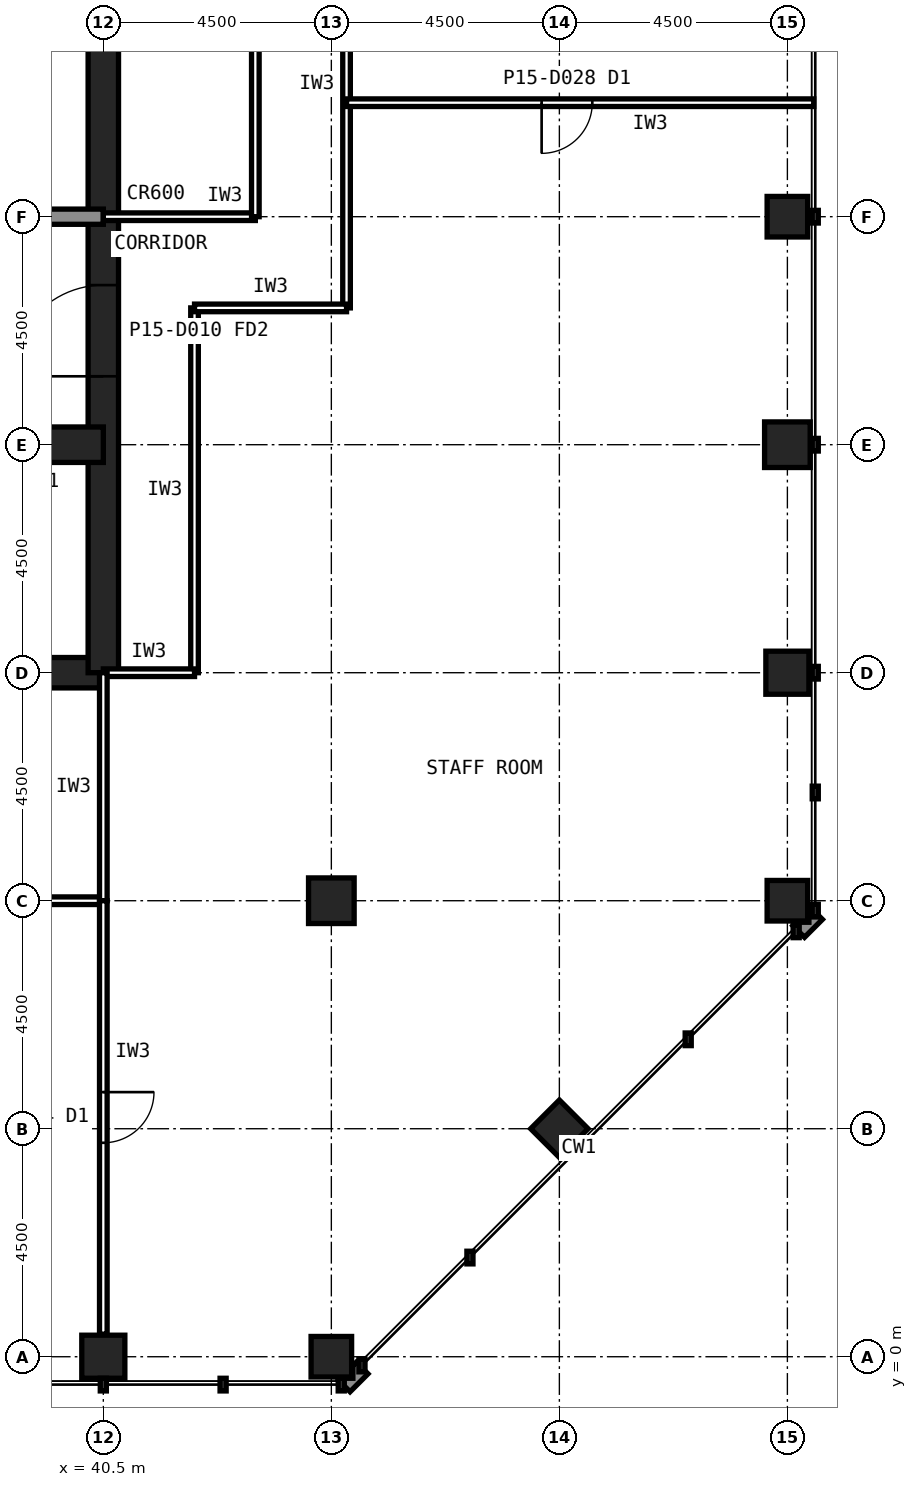
"""IFC4 building model, lengths in metres.
Left out: names, types, materials, properties, quantities, classifications, styles, units other than length and angle.
Written with IfcOpenShell. Run it as: python <this file> out.ifc"""

import sys

from ifc_helpers import new_model, si_unit, direction, frame, frame_2d, origin, origin_2d, place, context, subcontext, project, spatial, rectangle, hollow_rectangle, extrude, element, fill, save


model = new_model("IFC4")
c1 = context("Model", 3, precision=1e-05, world=origin(), true_north=direction((0.0, 1.0)))
c2 = subcontext(c1, "Body", "Model", "MODEL_VIEW")
j1 = project(units=[si_unit("LENGTHUNIT", "METRE"), si_unit("PLANEANGLEUNIT", "RADIAN")], contexts=[c1])
p1 = place(None, origin())
s1 = spatial("IfcSite", under=j1, at=p1, CompositionType="ELEMENT")
p2 = place(p1, origin())
s2 = spatial("IfcBuilding", under=s1, at=p2, CompositionType="ELEMENT")
p3 = place(p2, frame((0.0, 0.0, 62.6)))
s3 = spatial("IfcBuildingStorey", under=s2, at=p3, CompositionType="ELEMENT", Elevation=62.6)
p4 = place(p3, frame((40.5, 0.0, 0.0), z_axis=(0.0, 0.0, 1.0), x_axis=(1.0, 0.0, 0.0)))
e1 = element("IfcColumn", 1, at=p4, inside=s3, PredefinedType="COLUMN", context=c2, shape_type="SweptSolid", body=[
    extrude(hollow_rectangle(XDim=0.85, YDim=0.85, WallThickness=0.05, at=origin_2d()), origin(), (0.0, 0.0, 1.0), 4.2),
])
for number, where, z_axis, x_axis in (
    (2, (45.0, 0.0, 0.0), (0.0, 0.0, 1.0), (1.0, 0.0, 0.0)),
    (3, (54.0, 9.0, 0.0), (0.0, 0.0, 1.0), (1.0, 0.0, 0.0)),
):
    element("IfcColumn", number, at=place(p3, frame(where, z_axis=z_axis, x_axis=x_axis)), inside=s3, PredefinedType="COLUMN", context=c2, shape_type="SweptSolid", body=[
        extrude(hollow_rectangle(XDim=0.8, YDim=0.8, WallThickness=0.045, at=origin_2d()), origin(), (0.0, 0.0, 1.0), 4.2),
    ])
p5 = place(p3, frame((54.0, 13.5, 0.0), z_axis=(0.0, 0.0, 1.0), x_axis=(1.0, 0.0, 0.0)))
e4 = element("IfcColumn", 4, at=p5, inside=s3, PredefinedType="COLUMN", context=c2, shape_type="SweptSolid", body=[
    extrude(hollow_rectangle(XDim=0.85, YDim=0.85, WallThickness=0.05, at=origin_2d()), origin(), (0.0, 0.0, 1.0), 4.2),
])
p6 = place(p3, frame((54.0, 18.0, 0.0), z_axis=(0.0, 0.0, 1.0), x_axis=(1.0, 0.0, 0.0)))
e5 = element("IfcColumn", 5, at=p6, inside=s3, PredefinedType="COLUMN", context=c2, shape_type="SweptSolid", body=[
    extrude(hollow_rectangle(XDim=0.9, YDim=0.9, WallThickness=0.063, at=origin_2d()), origin(), (0.0, 0.0, 1.0), 4.2),
])
for number, where, z_axis, x_axis in (
    (6, (54.0, 22.5, 0.0), (0.0, 0.0, 1.0), (1.0, 0.0, 0.0)),
    (7, (49.5, 4.5, 0.0), (0.0, 0.0, 1.0), (0.707, 0.707, 0.0)),
):
    element("IfcColumn", number, at=place(p3, frame(where, z_axis=z_axis, x_axis=x_axis)), inside=s3, PredefinedType="COLUMN", context=c2, shape_type="SweptSolid", body=[
        extrude(hollow_rectangle(XDim=0.8, YDim=0.8, WallThickness=0.045, at=origin_2d()), origin(), (0.0, 0.0, 1.0), 4.2),
    ])
p7 = place(p3, frame((45.0, 9.0, 0.0), z_axis=(0.0, 0.0, 1.0), x_axis=(1.0, 0.0, 0.0)))
e8 = element("IfcColumn", 8, at=p7, inside=s3, PredefinedType="COLUMN", context=c2, shape_type="SweptSolid", body=[
    extrude(hollow_rectangle(XDim=0.9, YDim=0.9, WallThickness=0.063, at=origin_2d()), origin(), (0.0, 0.0, 1.0), 4.2),
])
p8 = place(p3, frame((13.5, 13.5, 0.0), z_axis=(0.0, 0.0, 1.0), x_axis=(1.0, 0.0, 0.0)))
e9 = element("IfcWall", 9, at=p8, inside=s3, PredefinedType="SHEAR", context=c2, shape_type="SweptSolid", body=[
    extrude(rectangle(XDim=27.0, YDim=0.6, at=frame_2d((13.5, 0.0))), origin(), (0.0, 0.0, 1.0), 4.2),
])
p9 = place(p3, frame((40.5, 13.5, 0.0), z_axis=(0.0, 0.0, 1.0), x_axis=(0.0, 1.0, 0.0)))
e10 = element("IfcWall", 10, at=p9, inside=s3, PredefinedType="SHEAR", context=c2, shape_type="SweptSolid", body=[
    extrude(rectangle(XDim=27.0, YDim=0.6, at=frame_2d((13.5, 0.0))), origin(), (0.0, 0.0, 1.0), 4.2),
])
p10 = place(p9, frame((5.85, 0.0, 0.0)))
e11 = element("IfcOpeningElement", 11, at=p10, cuts=e10, PredefinedType="OPENING", context=c2, shape_type="SweptSolid", body=[
    extrude(rectangle(XDim=1.8, YDim=2.1, at=frame_2d((0.9, 1.05))), frame((0.0, 0.31, 0.0), z_axis=(0.0, -1.0, 0.0), x_axis=(1.0, 0.0, 0.0)), (0.0, 0.0, 1.0), 0.62),
])
p11 = place(p9, frame((19.65, 0.0, 0.0)))
e12 = element("IfcOpeningElement", 12, at=p11, cuts=e10, PredefinedType="OPENING", context=c2, shape_type="SweptSolid", body=[
    extrude(rectangle(XDim=1.2, YDim=2.1, at=frame_2d((0.6, 1.05))), frame((0.0, 0.31, 0.0), z_axis=(0.0, -1.0, 0.0), x_axis=(1.0, 0.0, 0.0)), (0.0, 0.0, 1.0), 0.62),
])
p12 = place(p3, frame((13.5, 18.0, 0.0), z_axis=(0.0, 0.0, 1.0), x_axis=(1.0, 0.0, 0.0)))
e13 = element("IfcWall", 13, at=p12, inside=s3, PredefinedType="SHEAR", context=c2, shape_type="SweptSolid", body=[
    extrude(rectangle(XDim=27.0, YDim=0.7, at=frame_2d((13.5, 0.0))), origin(), (0.0, 0.0, 1.0), 4.2),
])
p13 = place(p12, frame((24.3, 0.0, 0.0)))
e14 = element("IfcOpeningElement", 14, at=p13, cuts=e13, PredefinedType="OPENING", context=c2, shape_type="SweptSolid", body=[
    extrude(rectangle(XDim=0.9, YDim=2.1, at=frame_2d((0.45, 1.05))), frame((0.0, 0.36, 0.0), z_axis=(0.0, -1.0, 0.0), x_axis=(1.0, 0.0, 0.0)), (0.0, 0.0, 1.0), 0.72),
])
p14 = place(p12, frame((5.45, 0.0, 0.0)))
e15 = element("IfcOpeningElement", 15, at=p14, cuts=e13, PredefinedType="OPENING", context=c2, shape_type="SweptSolid", body=[
    extrude(rectangle(XDim=1.1, YDim=2.1, at=frame_2d((0.55, 1.05))), frame((0.0, 0.36, 0.0), z_axis=(0.0, -1.0, 0.0), x_axis=(1.0, 0.0, 0.0)), (0.0, 0.0, 1.0), 0.72),
])
p15 = place(p12, frame((8.45, 0.0, 0.0)))
e16 = element("IfcOpeningElement", 16, at=p15, cuts=e13, PredefinedType="OPENING", context=c2, shape_type="SweptSolid", body=[
    extrude(rectangle(XDim=1.1, YDim=2.1, at=frame_2d((0.55, 1.05))), frame((0.0, 0.36, 0.0), z_axis=(0.0, -1.0, 0.0), x_axis=(1.0, 0.0, 0.0)), (0.0, 0.0, 1.0), 0.72),
])
p16 = place(p12, frame((11.45, 0.0, 0.0)))
e17 = element("IfcOpeningElement", 17, at=p16, cuts=e13, PredefinedType="OPENING", context=c2, shape_type="SweptSolid", body=[
    extrude(rectangle(XDim=1.1, YDim=2.1, at=frame_2d((0.55, 1.05))), frame((0.0, 0.36, 0.0), z_axis=(0.0, -1.0, 0.0), x_axis=(1.0, 0.0, 0.0)), (0.0, 0.0, 1.0), 0.72),
])
p17 = place(p12, frame((14.45, 0.0, 0.0)))
e18 = element("IfcOpeningElement", 18, at=p17, cuts=e13, PredefinedType="OPENING", context=c2, shape_type="SweptSolid", body=[
    extrude(rectangle(XDim=1.1, YDim=2.1, at=frame_2d((0.55, 1.05))), frame((0.0, 0.36, 0.0), z_axis=(0.0, -1.0, 0.0), x_axis=(1.0, 0.0, 0.0)), (0.0, 0.0, 1.0), 0.72),
])
p18 = place(p12, frame((17.45, 0.0, 0.0)))
e19 = element("IfcOpeningElement", 19, at=p18, cuts=e13, PredefinedType="OPENING", context=c2, shape_type="SweptSolid", body=[
    extrude(rectangle(XDim=1.1, YDim=2.1, at=frame_2d((0.55, 1.05))), frame((0.0, 0.36, 0.0), z_axis=(0.0, -1.0, 0.0), x_axis=(1.0, 0.0, 0.0)), (0.0, 0.0, 1.0), 0.72),
])
p19 = place(p12, frame((20.45, 0.0, 0.0)))
e20 = element("IfcOpeningElement", 20, at=p19, cuts=e13, PredefinedType="OPENING", context=c2, shape_type="SweptSolid", body=[
    extrude(rectangle(XDim=1.1, YDim=2.1, at=frame_2d((0.55, 1.05))), frame((0.0, 0.36, 0.0), z_axis=(0.0, -1.0, 0.0), x_axis=(1.0, 0.0, 0.0)), (0.0, 0.0, 1.0), 0.72),
])
p20 = place(p12, frame((1.6, 0.0, 0.0)))
e21 = element("IfcOpeningElement", 21, at=p20, cuts=e13, PredefinedType="OPENING", context=c2, shape_type="SweptSolid", body=[
    extrude(rectangle(XDim=1.3, YDim=2.2, at=frame_2d((0.65, 1.1))), frame((0.0, 0.36, 0.0), z_axis=(0.0, -1.0, 0.0), x_axis=(1.0, 0.0, 0.0)), (0.0, 0.0, 1.0), 0.72),
])
p21 = place(p3, frame((13.5, 22.5, 0.0), z_axis=(0.0, 0.0, 1.0), x_axis=(1.0, 0.0, 0.0)))
e22 = element("IfcWall", 22, at=p21, inside=s3, PredefinedType="SOLIDWALL", context=c2, shape_type="SweptSolid", body=[
    extrude(rectangle(XDim=27.0, YDim=0.3, at=frame_2d((13.5, 0.0))), origin(), (0.0, 0.0, 1.0), 4.04),
])
p22 = place(p21, frame((1.65, 0.0, 0.0)))
e23 = element("IfcOpeningElement", 23, at=p22, cuts=e22, PredefinedType="OPENING", context=c2, shape_type="SweptSolid", body=[
    extrude(rectangle(XDim=1.2, YDim=2.1, at=frame_2d((0.6, 1.05))), frame((0.0, 0.16, 0.0), z_axis=(0.0, -1.0, 0.0), x_axis=(1.0, 0.0, 0.0)), (0.0, 0.0, 1.0), 0.32),
])
p23 = place(p21, frame((6.025, 0.0, 0.0)))
e24 = element("IfcOpeningElement", 24, at=p23, cuts=e22, PredefinedType="OPENING", context=c2, shape_type="SweptSolid", body=[
    extrude(rectangle(XDim=1.0, YDim=2.1, at=frame_2d((0.5, 1.05))), frame((0.0, 0.16, 0.0), z_axis=(0.0, -1.0, 0.0), x_axis=(1.0, 0.0, 0.0)), (0.0, 0.0, 1.0), 0.32),
])
p24 = place(p21, frame((10.525, 0.0, 0.0)))
e25 = element("IfcOpeningElement", 25, at=p24, cuts=e22, PredefinedType="OPENING", context=c2, shape_type="SweptSolid", body=[
    extrude(rectangle(XDim=1.0, YDim=2.1, at=frame_2d((0.5, 1.05))), frame((0.0, 0.16, 0.0), z_axis=(0.0, -1.0, 0.0), x_axis=(1.0, 0.0, 0.0)), (0.0, 0.0, 1.0), 0.32),
])
p25 = place(p21, frame((19.75, 0.0, 0.0)))
e26 = element("IfcOpeningElement", 26, at=p25, cuts=e22, PredefinedType="OPENING", context=c2, shape_type="SweptSolid", body=[
    extrude(rectangle(XDim=1.0, YDim=2.1, at=frame_2d((0.5, 1.05))), frame((0.0, 0.16, 0.0), z_axis=(0.0, -1.0, 0.0), x_axis=(1.0, 0.0, 0.0)), (0.0, 0.0, 1.0), 0.32),
])
p26 = place(p21, frame((15.05, 0.0, 0.0)))
e27 = element("IfcOpeningElement", 27, at=p26, cuts=e22, PredefinedType="OPENING", context=c2, shape_type="SweptSolid", body=[
    extrude(rectangle(XDim=1.4, YDim=2.4, at=frame_2d((0.7, 1.2))), frame((0.0, 0.16, 0.0), z_axis=(0.0, -1.0, 0.0), x_axis=(1.0, 0.0, 0.0)), (0.0, 0.0, 1.0), 0.32),
])
p27 = place(p3, frame((45.3, 20.7, 0.0), z_axis=(0.0, 0.0, 1.0), x_axis=(0.0, 1.0, 0.0)))
e28 = element("IfcWall", 28, at=p27, inside=s3, PredefinedType="PARTITIONING", context=c2, shape_type="SweptSolid", body=[
    extrude(rectangle(XDim=12.6, YDim=0.15, at=frame_2d((6.3, 0.0))), origin(), (0.0, 0.0, 1.0), 4.04),
])
p28 = place(p27, frame((5.8, 0.0, 0.0)))
e29 = element("IfcOpeningElement", 29, at=p28, cuts=e28, PredefinedType="OPENING", context=c2, shape_type="SweptSolid", body=[
    extrude(rectangle(XDim=1.0, YDim=2.1, at=frame_2d((0.5, 1.05))), frame((0.0, 0.085, 0.0), z_axis=(0.0, -1.0, 0.0), x_axis=(1.0, 0.0, 0.0)), (0.0, 0.0, 1.0), 0.17),
])
p29 = place(p3, frame((42.3, 13.5, 0.0), z_axis=(0.0, 0.0, 1.0), x_axis=(0.0, 1.0, 0.0)))
e30 = element("IfcWall", 30, at=p29, inside=s3, PredefinedType="PARTITIONING", context=c2, shape_type="SweptSolid", body=[
    extrude(rectangle(XDim=7.2, YDim=0.15, at=frame_2d((3.6, 0.0))), origin(), (0.0, 0.0, 1.0), 4.04),
])
p30 = place(p3, frame((42.3, 20.7, 0.0), z_axis=(0.0, 0.0, 1.0), x_axis=(1.0, 0.0, 0.0)))
e31 = element("IfcWall", 31, at=p30, inside=s3, PredefinedType="PARTITIONING", context=c2, shape_type="SweptSolid", body=[
    extrude(rectangle(XDim=3.0, YDim=0.15, at=frame_2d((1.5, 0.0))), origin(), (0.0, 0.0, 1.0), 4.04),
])
p31 = place(p3, frame((40.5, 13.5, 0.0), z_axis=(0.0, 0.0, 1.0), x_axis=(1.0, 0.0, 0.0)))
e32 = element("IfcWall", 32, at=p31, inside=s3, PredefinedType="PARTITIONING", context=c2, shape_type="SweptSolid", body=[
    extrude(rectangle(XDim=1.8, YDim=0.15, at=frame_2d((0.9, 0.0))), origin(), (0.0, 0.0, 1.0), 3.189),
])
p32 = place(p3, frame((31.5, 9.0, 0.0), z_axis=(0.0, 0.0, 1.0), x_axis=(1.0, 0.0, 0.0)))
e33 = element("IfcWall", 33, at=p32, inside=s3, PredefinedType="PARTITIONING", context=c2, shape_type="SweptSolid", body=[
    extrude(rectangle(XDim=9.0, YDim=0.15, at=frame_2d((4.5, 0.0))), origin(), (0.0, 0.0, 1.0), 4.04),
])
p33 = place(p32, frame((4.0, 0.0, 0.0)))
e34 = element("IfcOpeningElement", 34, at=p33, cuts=e33, PredefinedType="OPENING", context=c2, shape_type="SweptSolid", body=[
    extrude(rectangle(XDim=1.0, YDim=2.1, at=frame_2d((0.5, 1.05))), frame((0.0, 0.085, 0.0), z_axis=(0.0, -1.0, 0.0), x_axis=(1.0, 0.0, 0.0)), (0.0, 0.0, 1.0), 0.17),
])
p34 = place(p3, frame((40.5, 9.0, 0.0), z_axis=(0.0, 0.0, 1.0), x_axis=(0.0, 1.0, 0.0)))
e35 = element("IfcWall", 35, at=p34, inside=s3, PredefinedType="PARTITIONING", context=c2, shape_type="SweptSolid", body=[
    extrude(rectangle(XDim=4.5, YDim=0.15, at=frame_2d((2.25, 0.0))), origin(), (0.0, 0.0, 1.0), 3.189),
])
p35 = place(p3, frame((40.5, 22.5, 0.0), z_axis=(0.0, 0.0, 1.0), x_axis=(1.0, 0.0, 0.0)))
e36 = element("IfcWall", 36, at=p35, inside=s3, PredefinedType="PARTITIONING", context=c2, shape_type="SweptSolid", body=[
    extrude(rectangle(XDim=3.0, YDim=0.15, at=frame_2d((1.5, 0.0))), origin(), (0.0, 0.0, 1.0), 3.189),
])
p36 = place(p3, frame((43.5, 22.5, 0.0), z_axis=(0.0, 0.0, 1.0), x_axis=(0.0, 1.0, 0.0)))
e37 = element("IfcWall", 37, at=p36, inside=s3, PredefinedType="PARTITIONING", context=c2, shape_type="SweptSolid", body=[
    extrude(rectangle(XDim=9.0, YDim=0.15, at=frame_2d((4.5, 0.0))), origin(), (0.0, 0.0, 1.0), 4.04),
])
p37 = place(p3, frame((54.52, 24.75, 0.0), z_axis=(0.0, 0.0, 1.0), x_axis=(-1.0, 0.0, 0.0)))
e38 = element("IfcWall", 38, at=p37, inside=s3, PredefinedType="PARTITIONING", context=c2, shape_type="SweptSolid", body=[
    extrude(rectangle(XDim=9.22, YDim=0.15, at=frame_2d((4.61, 0.0))), origin(), (0.0, 0.0, 1.0), 4.04),
])
p38 = place(p37, frame((4.37, 0.0, 0.0)))
e39 = element("IfcOpeningElement", 39, at=p38, cuts=e38, PredefinedType="OPENING", context=c2, shape_type="SweptSolid", body=[
    extrude(rectangle(XDim=1.0, YDim=2.1, at=frame_2d((0.5, 1.05))), frame((0.0, 0.085, 0.0), z_axis=(0.0, -1.0, 0.0), x_axis=(1.0, 0.0, 0.0)), (0.0, 0.0, 1.0), 0.17),
])
p39 = place(p3, frame((40.5, 9.0, 0.0), z_axis=(0.0, 0.0, 1.0), x_axis=(0.0, -1.0, 0.0)))
e40 = element("IfcWall", 40, at=p39, inside=s3, PredefinedType="PARTITIONING", context=c2, shape_type="SweptSolid", body=[
    extrude(rectangle(XDim=8.555, YDim=0.15, at=frame_2d((4.277, 0.0))), origin(), (0.0, 0.0, 1.0), 3.189),
])
p40 = place(p39, frame((3.778, 0.0, 0.0)))
e41 = element("IfcOpeningElement", 41, at=p40, cuts=e40, PredefinedType="OPENING", context=c2, shape_type="SweptSolid", body=[
    extrude(rectangle(XDim=1.0, YDim=2.1, at=frame_2d((0.5, 1.05))), frame((0.0, 0.085, 0.0), z_axis=(0.0, -1.0, 0.0), x_axis=(1.0, 0.0, 0.0)), (0.0, 0.0, 1.0), 0.17),
])
p41 = place(p10, origin())
e42 = element("IfcDoor", 42, at=p41, inside=s3, OperationType="SINGLE_SWING_LEFT", PredefinedType="DOOR", context=c2, shape_type="SweptSolid", body=[
    extrude(rectangle(XDim=1.8, YDim=2.1, at=frame_2d((0.9, 1.05))), frame((0.0, 0.025, 0.0), z_axis=(0.0, -1.0, 0.0), x_axis=(1.0, 0.0, 0.0)), (0.0, 0.0, 1.0), 0.05),
])
fill(e11, e42)
p42 = place(p38, origin())
e43 = element("IfcDoor", 43, at=p42, inside=s3, OperationType="SINGLE_SWING_RIGHT", PredefinedType="DOOR", context=c2, shape_type="SweptSolid", body=[
    extrude(rectangle(XDim=1.0, YDim=2.1, at=frame_2d((0.5, 1.05))), frame((0.0, 0.025, 0.0), z_axis=(0.0, -1.0, 0.0), x_axis=(1.0, 0.0, 0.0)), (0.0, 0.0, 1.0), 0.05),
])
fill(e39, e43)
p43 = place(p40, origin())
e44 = element("IfcDoor", 44, at=p43, inside=s3, OperationType="SINGLE_SWING_LEFT", PredefinedType="DOOR", context=c2, shape_type="SweptSolid", body=[
    extrude(rectangle(XDim=1.0, YDim=2.1, at=frame_2d((0.5, 1.05))), frame((0.0, 0.025, 0.0), z_axis=(0.0, -1.0, 0.0), x_axis=(1.0, 0.0, 0.0)), (0.0, 0.0, 1.0), 0.05),
])
fill(e41, e44)
save(model, sys.argv[1])
